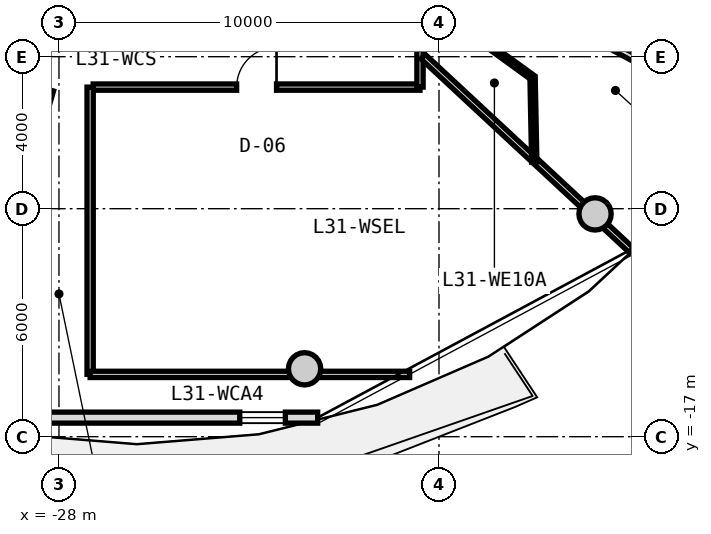
"""IFC4 building model, lengths in metres.
Left out: names, types, materials, properties, quantities, classifications, styles, units other than length and angle.
Written with IfcOpenShell. Run it as: python <this file> out.ifc"""

import sys

from ifc_helpers import new_model, si_unit, direction, frame, frame_2d, origin, origin_2d, place, context, subcontext, project, spatial, rectangle, circle, extrude, source, transform, mapped, element, fill, save


model = new_model("IFC4")
c1 = context("Model", 3, precision=1e-05, world=origin(), true_north=direction((0.0, 1.0)))
c2 = subcontext(c1, "Body", "Model", "MODEL_VIEW")
j1 = project(units=[si_unit("LENGTHUNIT", "METRE"), si_unit("PLANEANGLEUNIT", "RADIAN")], contexts=[c1])
p1 = place(None, origin())
s1 = spatial("IfcSite", under=j1, at=p1, CompositionType="ELEMENT")
p2 = place(p1, origin())
s2 = spatial("IfcBuilding", under=s1, at=p2, CompositionType="ELEMENT")
p3 = place(p2, frame((0.0, 0.0, 102.35)))
s3 = spatial("IfcBuildingStorey", under=s2, at=p3, CompositionType="ELEMENT", Elevation=102.35)
m1 = source(origin(), c2, "Body", "SweptSolid", [
    extrude(circle(Radius=0.425, at=origin_2d()), origin(), (0.0, 0.0, 1.0), 3.05),
])
for number, where, z_axis, x_axis in (
    (1, (-21.537, -15.213, 0.0), (0.0, 0.0, 1.0), (1.0, 0.0, 0.0)),
    (2, (-13.894, -11.137, 0.0), (0.0, 0.0, 1.0), (1.0, 0.0, 0.0)),
):
    element("IfcColumn", number, at=place(p3, frame(where, z_axis=z_axis, x_axis=x_axis)), inside=s3, PredefinedType="COLUMN", context=c2, shape_type="MappedRepresentation", body=[
        mapped(m1, transform((0.0, 0.0, 0.0), x_axis=(1.0, 0.0, 0.0), y_axis=(0.0, 1.0, 0.0), z_axis=(0.0, 0.0, 1.0), scale=1.0)),
    ])
m2 = source(origin(), c2, "Body", "SweptSolid", [
    extrude(rectangle(XDim=9.514, YDim=0.29, at=frame_2d((4.757, 0.0))), origin(), (0.0, 0.0, 1.0), 2.79),
])
p4 = place(p3, frame((-21.193, -16.498, 0.0), z_axis=(0.0, 0.0, 1.0), x_axis=(-1.0, 0.0, 0.0)))
e3 = element("IfcWall", 3, at=p4, inside=s3, PredefinedType="SOLIDWALL", context=c2, shape_type="MappedRepresentation", body=[
    mapped(m2, transform((0.0, 0.0, 0.0), x_axis=(1.0, 0.0, 0.0), y_axis=(0.0, 1.0, 0.0), z_axis=(0.0, 0.0, 1.0), scale=1.0)),
])
p5 = place(p4, frame((7.38, 0.0, 0.0)))
e4 = element("IfcOpeningElement", 4, at=p5, cuts=e3, PredefinedType="OPENING", context=c2, shape_type="SweptSolid", body=[
    extrude(rectangle(XDim=1.15, YDim=2.25, at=frame_2d((0.575, 1.125))), frame((0.0, 0.155, 0.0), z_axis=(0.0, -1.0, 0.0), x_axis=(1.0, 0.0, 0.0)), (0.0, 0.0, 1.0), 0.31),
])
p6 = place(p4, frame((0.85, 0.0, 0.85)))
e5 = element("IfcOpeningElement", 5, at=p6, cuts=e3, PredefinedType="OPENING", context=c2, shape_type="SweptSolid", body=[
    extrude(rectangle(XDim=1.2, YDim=1.5, at=frame_2d((0.6, 0.75))), frame((0.0, 0.155, 0.0), z_axis=(0.0, -1.0, 0.0), x_axis=(1.0, 0.0, 0.0)), (0.0, 0.0, 1.0), 0.31),
])
m3 = source(origin(), c2, "Body", "SweptSolid", [
    extrude(rectangle(XDim=8.6, YDim=0.165, at=frame_2d((4.3, 0.0))), origin(), (0.0, 0.0, 1.0), 2.775),
])
p7 = place(p3, frame((-18.5, -7.8, 0.0), z_axis=(0.0, 0.0, 1.0), x_axis=(-1.0, 0.0, 0.0)))
e6 = element("IfcWall", 6, at=p7, inside=s3, PredefinedType="PARTITIONING", context=c2, shape_type="MappedRepresentation", body=[
    mapped(m3, transform((0.0, 0.0, 0.0), x_axis=(1.0, 0.0, 0.0), y_axis=(0.0, 1.0, 0.0), z_axis=(0.0, 0.0, 1.0), scale=1.0)),
])
p8 = place(p7, frame((3.775, 0.0, 0.0)))
e7 = element("IfcOpeningElement", 7, at=p8, cuts=e6, PredefinedType="OPENING", context=c2, shape_type="SweptSolid", body=[
    extrude(rectangle(XDim=1.05, YDim=2.15, at=frame_2d((0.525, 1.075))), frame((0.0, 0.093, 0.0), z_axis=(0.0, -1.0, 0.0), x_axis=(1.0, 0.0, 0.0)), (0.0, 0.0, 1.0), 0.185),
])
m4 = source(origin(), c2, "Body", "SweptSolid", [
    extrude(rectangle(XDim=15.6, YDim=0.165, at=frame_2d((7.8, 0.0))), origin(), (0.0, 0.0, 1.0), 2.775),
])
p9 = place(p3, frame((-18.5, 7.8, 0.0), z_axis=(0.0, 0.0, 1.0), x_axis=(0.0, -1.0, 0.0)))
e8 = element("IfcWall", 8, at=p9, inside=s3, PredefinedType="PARTITIONING", context=c2, shape_type="MappedRepresentation", body=[
    mapped(m4, transform((0.0, 0.0, 0.0), x_axis=(1.0, 0.0, 0.0), y_axis=(0.0, 1.0, 0.0), z_axis=(0.0, 0.0, 1.0), scale=1.0)),
])
p10 = place(p9, frame((12.002, 0.0, 0.0)))
e9 = element("IfcOpeningElement", 9, at=p10, cuts=e8, PredefinedType="OPENING", context=c2, shape_type="SweptSolid", body=[
    extrude(rectangle(XDim=1.05, YDim=2.15, at=frame_2d((0.525, 1.075))), frame((0.0, 0.093, 0.0), z_axis=(0.0, -1.0, 0.0), x_axis=(1.0, 0.0, 0.0)), (0.0, 0.0, 1.0), 0.185),
])
p11 = place(p9, frame((10.211, 0.0, 0.0)))
e10 = element("IfcOpeningElement", 10, at=p11, cuts=e8, PredefinedType="OPENING", context=c2, shape_type="SweptSolid", body=[
    extrude(rectangle(XDim=1.05, YDim=2.15, at=frame_2d((0.525, 1.075))), frame((0.0, 0.093, 0.0), z_axis=(0.0, -1.0, 0.0), x_axis=(1.0, 0.0, 0.0)), (0.0, 0.0, 1.0), 0.185),
])
p12 = place(p9, frame((7.722, 0.0, 0.0)))
e11 = element("IfcOpeningElement", 11, at=p12, cuts=e8, PredefinedType="OPENING", context=c2, shape_type="SweptSolid", body=[
    extrude(rectangle(XDim=1.05, YDim=2.15, at=frame_2d((0.525, 1.075))), frame((0.0, 0.093, 0.0), z_axis=(0.0, -1.0, 0.0), x_axis=(1.0, 0.0, 0.0)), (0.0, 0.0, 1.0), 0.185),
])
p13 = place(p9, frame((6.291, 0.0, 0.0)))
e12 = element("IfcOpeningElement", 12, at=p13, cuts=e8, PredefinedType="OPENING", context=c2, shape_type="SweptSolid", body=[
    extrude(rectangle(XDim=1.05, YDim=2.15, at=frame_2d((0.525, 1.075))), frame((0.0, 0.093, 0.0), z_axis=(0.0, -1.0, 0.0), x_axis=(1.0, 0.0, 0.0)), (0.0, 0.0, 1.0), 0.185),
])
p14 = place(p9, frame((2.465, 0.0, 0.0)))
e13 = element("IfcOpeningElement", 13, at=p14, cuts=e8, PredefinedType="OPENING", context=c2, shape_type="SweptSolid", body=[
    extrude(rectangle(XDim=1.25, YDim=2.2, at=frame_2d((0.625, 1.1))), frame((0.0, 0.093, 0.0), z_axis=(0.0, -1.0, 0.0), x_axis=(1.0, 0.0, 0.0)), (0.0, 0.0, 1.0), 0.185),
])
m5 = source(origin(), c2, "Body", "SweptSolid", [
    extrude(rectangle(XDim=8.989, YDim=0.165, at=frame_2d((4.495, 0.0))), origin(), (0.0, 0.0, 1.0), 2.275),
])
p15 = place(p3, frame((-28.222, -7.88, 0.0), z_axis=(0.0, 0.0, 1.0), x_axis=(-0.27702323008, -0.960863221274, 0.0)))
e14 = element("IfcWall", 14, at=p15, inside=s3, PredefinedType="PARTITIONING", context=c2, shape_type="MappedRepresentation", body=[
    mapped(m5, transform((0.0, 0.0, 0.0), x_axis=(1.0, 0.0, 0.0), y_axis=(0.0, 1.0, 0.0), z_axis=(0.0, 0.0, 1.0), scale=1.0)),
])
m6 = source(origin(), c2, "Body", "SweptSolid", [
    extrude(rectangle(XDim=7.482, YDim=0.165, at=frame_2d((3.741, 0.0))), origin(), (0.0, 0.0, 1.0), 2.275),
])
p16 = place(p3, frame((-18.42, -6.998, 0.0), z_axis=(0.0, 0.0, 1.0), x_axis=(0.732508698043, -0.680757671489, 0.0)))
e15 = element("IfcWall", 15, at=p16, inside=s3, PredefinedType="PARTITIONING", context=c2, shape_type="MappedRepresentation", body=[
    mapped(m6, transform((0.0, 0.0, 0.0), x_axis=(1.0, 0.0, 0.0), y_axis=(0.0, 1.0, 0.0), z_axis=(0.0, 0.0, 1.0), scale=1.0)),
])
m7 = source(origin(), c2, "Body", "SweptSolid", [
    extrude(rectangle(XDim=7.56, YDim=0.165, at=frame_2d((3.78, 0.0))), origin(), (0.0, 0.0, 1.0), 2.775),
])
p17 = place(p3, frame((-27.18, -15.36, 0.0), z_axis=(0.0, 0.0, 1.0), x_axis=(0.0, 1.0, 0.0)))
e16 = element("IfcWall", 16, at=p17, inside=s3, PredefinedType="PARTITIONING", context=c2, shape_type="MappedRepresentation", body=[
    mapped(m7, transform((0.0, 0.0, 0.0), x_axis=(1.0, 0.0, 0.0), y_axis=(0.0, 1.0, 0.0), z_axis=(0.0, 0.0, 1.0), scale=1.0)),
])
m8 = source(origin(), c2, "Body", "SweptSolid", [
    extrude(rectangle(XDim=8.407, YDim=0.165, at=frame_2d((4.204, 0.0))), origin(), (0.0, 0.0, 1.0), 2.275),
])
p18 = place(p3, frame((-27.18, -15.36, 0.0), z_axis=(0.0, 0.0, 1.0), x_axis=(1.0, 0.0, 0.0)))
e17 = element("IfcWall", 17, at=p18, inside=s3, PredefinedType="PARTITIONING", context=c2, shape_type="MappedRepresentation", body=[
    mapped(m8, transform((0.0, 0.0, 0.0), x_axis=(1.0, 0.0, 0.0), y_axis=(0.0, 1.0, 0.0), z_axis=(0.0, 0.0, 1.0), scale=1.0)),
])
m9 = source(origin(), c2, "Body", "SweptSolid", [
    extrude(rectangle(XDim=8.744, YDim=0.19, at=frame_2d((4.372, 0.0))), origin(), (0.0, 0.0, 1.0), 2.775),
])
p19 = place(p3, frame((-18.273, -4.142, 0.0), z_axis=(0.0, 0.0, 1.0), x_axis=(0.882252449936, -0.470776607938, 0.0)))
e18 = element("IfcWall", 18, at=p19, inside=s3, PredefinedType="PARTITIONING", context=c2, shape_type="MappedRepresentation", body=[
    mapped(m9, transform((0.0, 0.0, 0.0), x_axis=(1.0, 0.0, 0.0), y_axis=(0.0, 1.0, 0.0), z_axis=(0.0, 0.0, 1.0), scale=1.0)),
])
m10 = source(origin(), c2, "Body", "SweptSolid", [
    extrude(rectangle(XDim=3.621, YDim=0.14, at=frame_2d((1.811, 0.0))), origin(), (0.0, 0.0, 1.0), 2.775),
])
p20 = place(p3, frame((-18.47, -5.422, 0.0), z_axis=(0.0, 0.0, 1.0), x_axis=(0.80968252222, -0.586868139544, 0.0)))
e19 = element("IfcWall", 19, at=p20, inside=s3, PredefinedType="PARTITIONING", context=c2, shape_type="MappedRepresentation", body=[
    mapped(m10, transform((0.0, 0.0, 0.0), x_axis=(1.0, 0.0, 0.0), y_axis=(0.0, 1.0, 0.0), z_axis=(0.0, 0.0, 1.0), scale=1.0)),
])
p21 = place(p20, frame((1.351, 0.0, 0.0)))
e20 = element("IfcOpeningElement", 20, at=p21, cuts=e19, PredefinedType="OPENING", context=c2, shape_type="SweptSolid", body=[
    extrude(rectangle(XDim=0.92, YDim=2.1, at=frame_2d((0.46, 1.05))), frame((0.0, 0.08, 0.0), z_axis=(0.0, -1.0, 0.0), x_axis=(1.0, 0.0, 0.0)), (0.0, 0.0, 1.0), 0.16),
])
m11 = source(origin(), c2, "Body", "SweptSolid", [
    extrude(rectangle(XDim=2.225, YDim=0.14, at=frame_2d((1.112, 0.0))), origin(), (0.0, 0.0, 1.0), 2.775),
])
p22 = place(p3, frame((-15.538, -7.547, 0.0), z_axis=(0.0, 0.0, 1.0), x_axis=(0.019971869027, -0.999800542332, 0.0)))
e21 = element("IfcWall", 21, at=p22, inside=s3, PredefinedType="PARTITIONING", context=c2, shape_type="MappedRepresentation", body=[
    mapped(m11, transform((0.0, 0.0, 0.0), x_axis=(1.0, 0.0, 0.0), y_axis=(0.0, 1.0, 0.0), z_axis=(0.0, 0.0, 1.0), scale=1.0)),
])
m12 = source(origin(), c2, "Body", "SweptSolid", [
    extrude(rectangle(XDim=1.2, YDim=1.5, at=frame_2d((0.6, 0.75))), frame((0.0, 0.03, 0.0), z_axis=(0.0, -1.0, 0.0), x_axis=(1.0, 0.0, 0.0)), (0.0, 0.0, 1.0), 0.06),
])
p23 = place(p6, origin())
e22 = element("IfcWindow", 22, at=p23, inside=s3, PartitioningType="SINGLE_PANEL", PredefinedType="WINDOW", context=c2, shape_type="MappedRepresentation", body=[
    mapped(m12, transform((0.0, 0.0, 0.0), x_axis=(1.0, 0.0, 0.0), y_axis=(0.0, 1.0, 0.0), z_axis=(0.0, 0.0, 1.0), scale=1.0)),
])
fill(e5, e22)
m13 = source(origin(), c2, "Body", "SweptSolid", [
    extrude(rectangle(XDim=1.05, YDim=2.15, at=frame_2d((0.525, 1.075))), frame((0.0, 0.025, 0.0), z_axis=(0.0, -1.0, 0.0), x_axis=(1.0, 0.0, 0.0)), (0.0, 0.0, 1.0), 0.05),
])
p24 = place(p8, frame((1.05, 0.0, 0.0), z_axis=(0.0, 0.0, 1.0), x_axis=(-1.0, 0.0, 0.0)))
e23 = element("IfcDoor", 23, at=p24, inside=s3, OperationType="SINGLE_SWING_RIGHT", PredefinedType="DOOR", context=c2, shape_type="MappedRepresentation", body=[
    mapped(m13, transform((0.0, 0.0, 0.0), x_axis=(1.0, 0.0, 0.0), y_axis=(0.0, 1.0, 0.0), z_axis=(0.0, 0.0, 1.0), scale=1.0)),
])
fill(e7, e23)
save(model, sys.argv[1])
